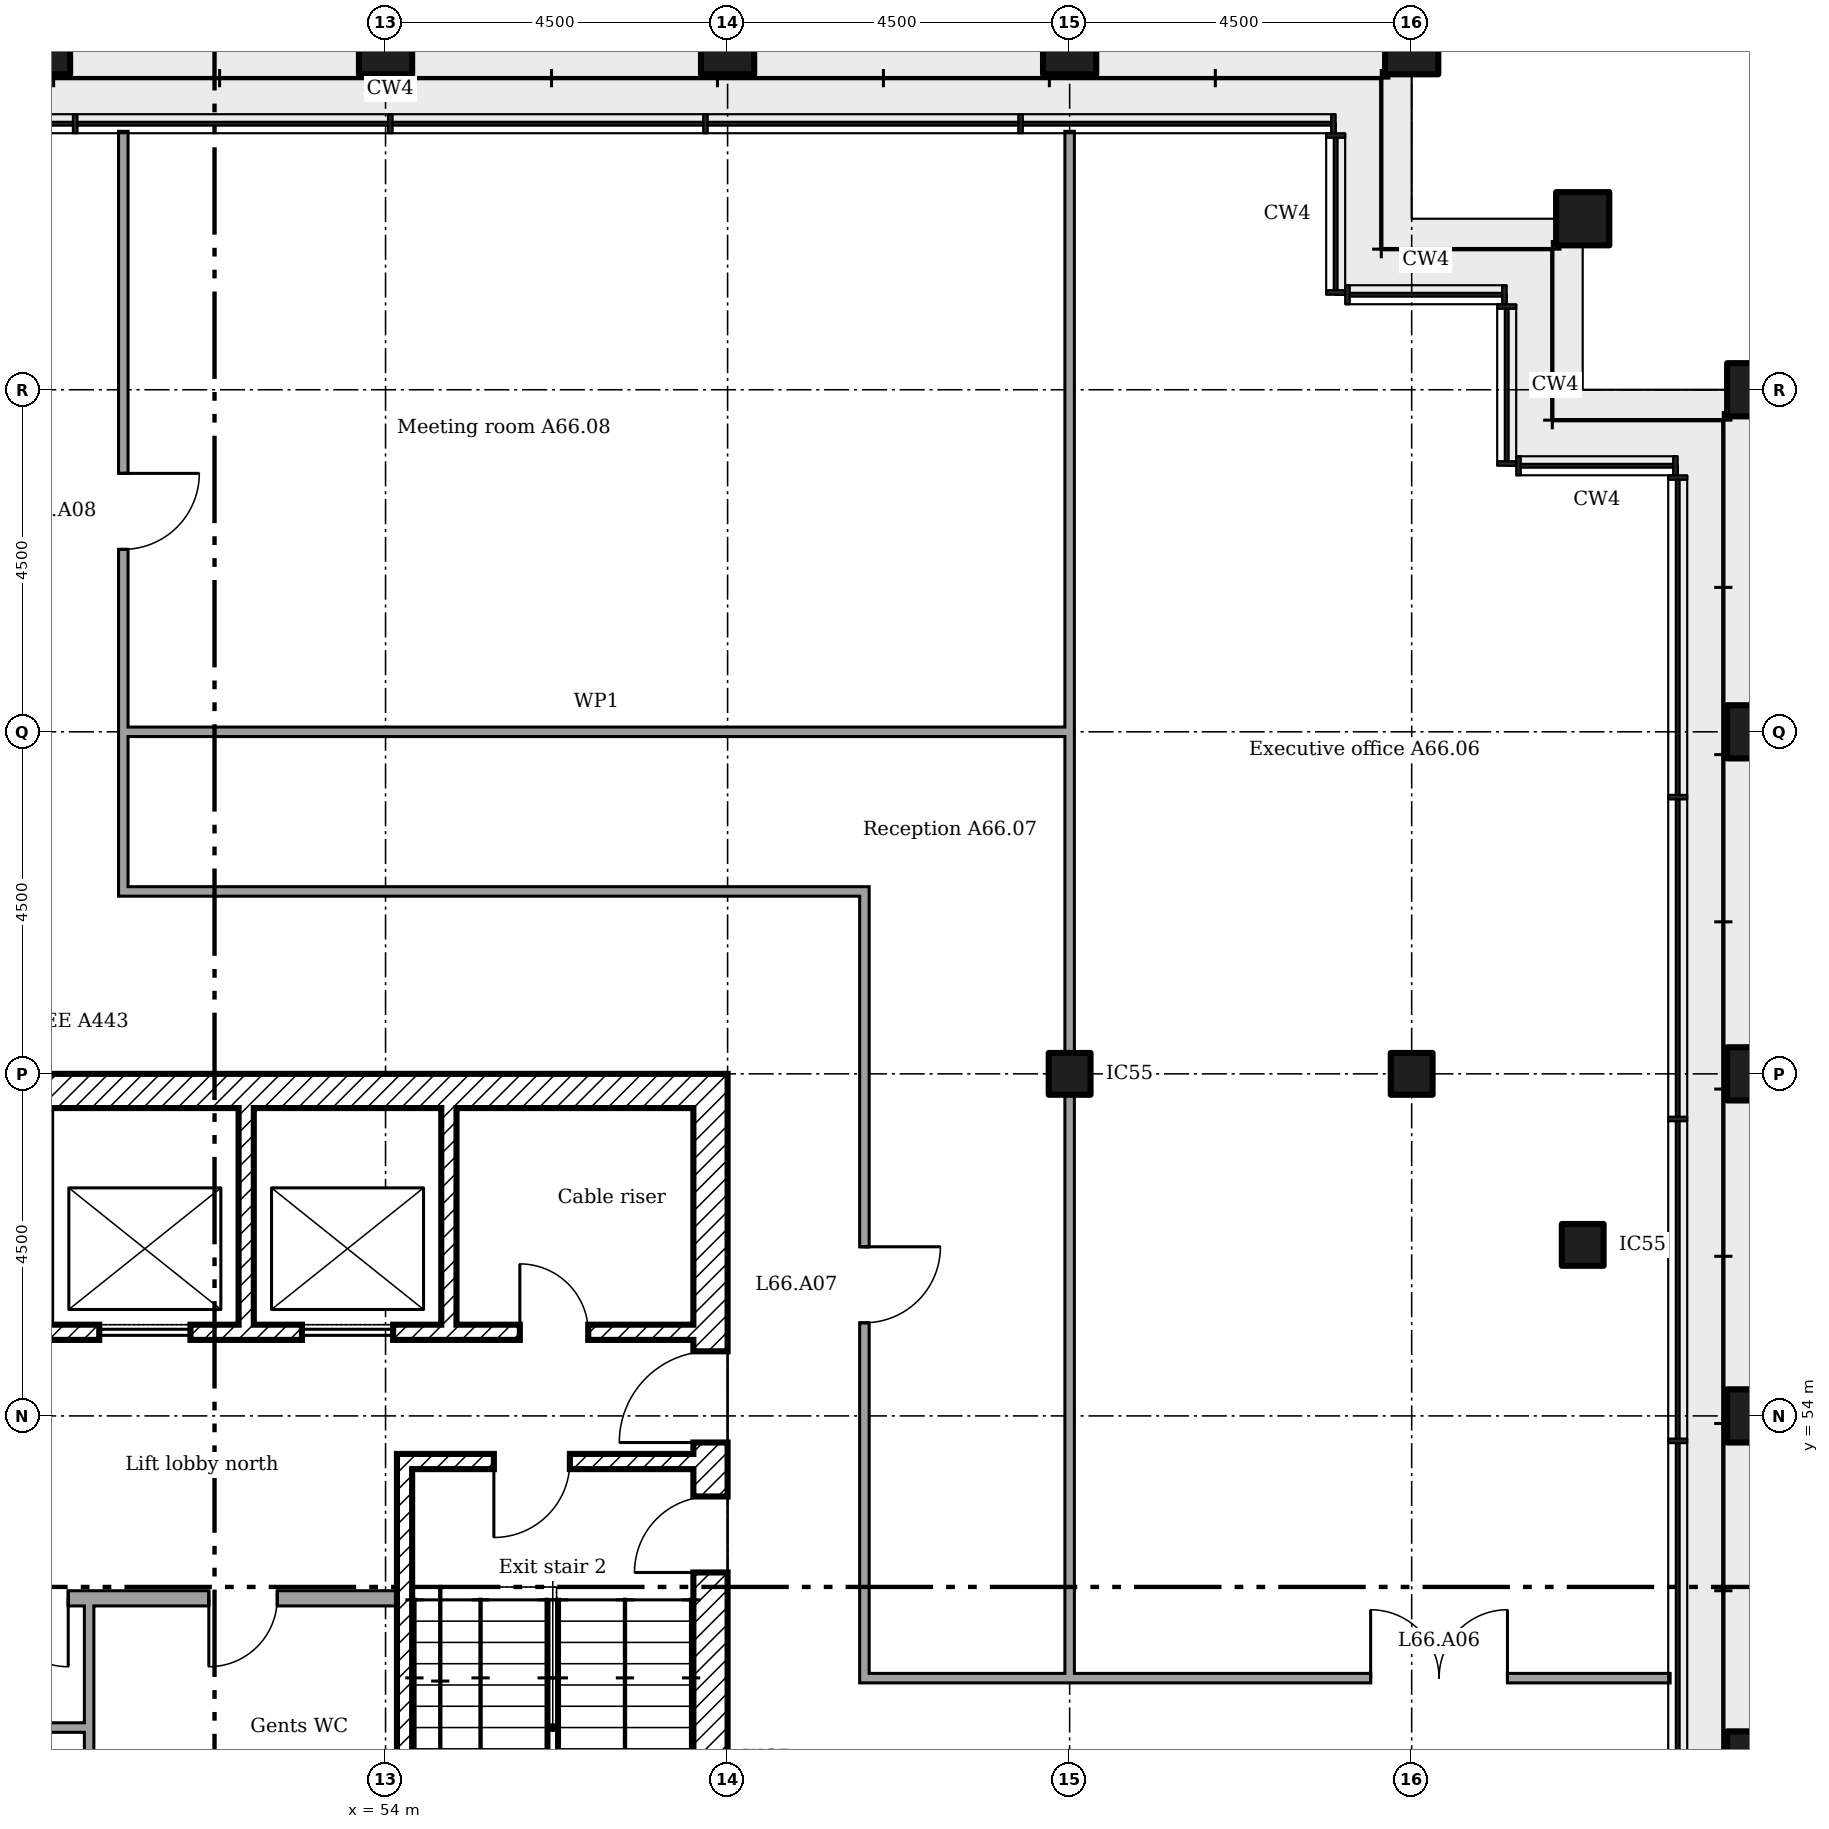
"""IFC4 building model, lengths in metres.
Left out: names, types, materials, properties, quantities, classifications, styles, units other than length and angle.
Written with IfcOpenShell. Run it as: python <this file> out.ifc"""

import sys

from ifc_helpers import new_model, si_unit, direction, frame, frame_2d, origin, origin_2d, place, context, subcontext, project, spatial, rectangle, extrude, element, fill, save


model = new_model("IFC4")
c1 = context("Model", 3, precision=1e-05, world=origin(), true_north=direction((0.0, 1.0)))
c2 = subcontext(c1, "Body", "Model", "MODEL_VIEW")
j1 = project(units=[si_unit("LENGTHUNIT", "METRE"), si_unit("PLANEANGLEUNIT", "RADIAN")], contexts=[c1])
p1 = place(None, origin())
s1 = spatial("IfcSite", under=j1, at=p1, CompositionType="ELEMENT")
p2 = place(p1, origin())
s2 = spatial("IfcBuilding", under=s1, at=p2, CompositionType="ELEMENT")
p3 = place(p2, frame((0.0, 0.0, 259.4)))
s3 = spatial("IfcBuildingStorey", under=s2, at=p3, CompositionType="ELEMENT", Elevation=259.4)
for number, where in (
    (1, (72.0, 49.5, 0.0)),
    (2, (72.0, 54.0, 0.0)),
    (3, (72.0, 58.5, 0.0)),
    (4, (72.0, 63.0, 0.0)),
    (5, (72.0, 67.5, 0.0)),
    (6, (69.75, 69.75, 0.0)),
    (7, (67.5, 72.0, 0.0)),
    (8, (63.0, 72.0, 0.0)),
    (9, (58.5, 72.0, 0.0)),
    (10, (54.0, 72.0, 0.0)),
    (11, (49.5, 72.0, 0.0)),
):
    element("IfcColumn", number, at=place(p3, frame(where)), inside=s3, PredefinedType="COLUMN", context=c2, shape_type="SweptSolid", body=[
        extrude(rectangle(XDim=0.7, YDim=0.7, at=origin_2d()), origin(), (0.0, 0.0, 1.0), 4.2),
    ])
for number, where in (
    (12, (63.0, 58.5, 0.0)),
    (13, (67.5, 58.5, 0.0)),
    (14, (69.75, 56.25, 0.0)),
):
    element("IfcColumn", number, at=place(p3, frame(where)), inside=s3, PredefinedType="COLUMN", context=c2, shape_type="SweptSolid", body=[
        extrude(rectangle(XDim=0.55, YDim=0.55, at=origin_2d()), origin(), (0.0, 0.0, 1.0), 4.2),
    ])
p4 = place(p3, frame((58.275, 40.5, 0.0), z_axis=(0.0, 0.0, 1.0), x_axis=(0.0, 1.0, 0.0)))
e15 = element("IfcWall", 15, at=p4, inside=s3, PredefinedType="SHEAR", context=c2, shape_type="SweptSolid", body=[
    extrude(rectangle(XDim=18.0, YDim=0.45, at=frame_2d((9.0, 0.0))), origin(), (0.0, 0.0, 1.0), 3.925),
])
p5 = place(p4, frame((13.15, 0.0, 0.0)))
e16 = element("IfcOpeningElement", 16, at=p5, cuts=e15, PredefinedType="OPENING", context=c2, shape_type="SweptSolid", body=[
    extrude(rectangle(XDim=1.2, YDim=2.1, at=frame_2d((0.6, 1.05))), frame((0.0, 0.235, 0.0), z_axis=(0.0, -1.0, 0.0), x_axis=(1.0, 0.0, 0.0)), (0.0, 0.0, 1.0), 0.47),
])
p6 = place(p4, frame((3.9, 0.0, 0.0)))
e17 = element("IfcOpeningElement", 17, at=p6, cuts=e15, PredefinedType="OPENING", context=c2, shape_type="SweptSolid", body=[
    extrude(rectangle(XDim=1.8, YDim=2.1, at=frame_2d((0.9, 1.05))), frame((0.0, 0.235, 0.0), z_axis=(0.0, -1.0, 0.0), x_axis=(1.0, 0.0, 0.0)), (0.0, 0.0, 1.0), 0.47),
])
p7 = place(p4, frame((11.44, 0.0, 0.0)))
e18 = element("IfcOpeningElement", 18, at=p7, cuts=e15, PredefinedType="OPENING", context=c2, shape_type="SweptSolid", body=[
    extrude(rectangle(XDim=1.0, YDim=2.1, at=frame_2d((0.5, 1.05))), frame((0.0, 0.235, 0.0), z_axis=(0.0, -1.0, 0.0), x_axis=(1.0, 0.0, 0.0)), (0.0, 0.0, 1.0), 0.47),
])
p8 = place(p3, frame((40.5, 58.275, 0.0)))
e19 = element("IfcWall", 19, at=p8, inside=s3, PredefinedType="SHEAR", context=c2, shape_type="SweptSolid", body=[
    extrude(rectangle(XDim=17.55, YDim=0.45, at=frame_2d((8.775, 0.0))), origin(), (0.0, 0.0, 1.0), 3.925),
])
for number, where, z_axis, x_axis in (
    (20, (52.167, 58.05, 0.0), (0.0, 0.0, 1.0), (0.0, -1.0, 0.0)),
    (21, (54.833, 58.05, 0.0), (0.0, 0.0, 1.0), (0.0, -1.0, 0.0)),
):
    element("IfcWall", number, at=place(p3, frame(where, z_axis=z_axis, x_axis=x_axis)), inside=s3, PredefinedType="SHEAR", context=c2, shape_type="SweptSolid", body=[
        extrude(rectangle(XDim=2.85, YDim=0.2, at=frame_2d((1.425, 0.0))), origin(), (0.0, 0.0, 1.0), 3.925),
    ])
p9 = place(p3, frame((46.933, 55.1, 0.0)))
e22 = element("IfcWall", 22, at=p9, inside=s3, PredefinedType="SHEAR", context=c2, shape_type="SweptSolid", body=[
    extrude(rectangle(XDim=11.117, YDim=0.2, at=frame_2d((5.558, 0.0))), origin(), (0.0, 0.0, 1.0), 3.925),
])
p10 = place(p9, frame((8.833, 0.0, 0.0)))
e23 = element("IfcOpeningElement", 23, at=p10, cuts=e22, PredefinedType="OPENING", context=c2, shape_type="SweptSolid", body=[
    extrude(rectangle(XDim=0.9, YDim=2.1, at=frame_2d((0.45, 1.05))), frame((0.0, 0.11, 0.0), z_axis=(0.0, -1.0, 0.0), x_axis=(1.0, 0.0, 0.0)), (0.0, 0.0, 1.0), 0.22),
])
p11 = place(p9, frame((0.633, 0.0, 0.0)))
e24 = element("IfcOpeningElement", 24, at=p11, cuts=e22, PredefinedType="OPENING", context=c2, shape_type="SweptSolid", body=[
    extrude(rectangle(XDim=1.2, YDim=2.1, at=frame_2d((0.6, 1.05))), frame((0.0, 0.11, 0.0), z_axis=(0.0, -1.0, 0.0), x_axis=(1.0, 0.0, 0.0)), (0.0, 0.0, 1.0), 0.22),
])
p12 = place(p9, frame((3.3, 0.0, 0.0)))
e25 = element("IfcOpeningElement", 25, at=p12, cuts=e22, PredefinedType="OPENING", context=c2, shape_type="SweptSolid", body=[
    extrude(rectangle(XDim=1.2, YDim=2.1, at=frame_2d((0.6, 1.05))), frame((0.0, 0.11, 0.0), z_axis=(0.0, -1.0, 0.0), x_axis=(1.0, 0.0, 0.0)), (0.0, 0.0, 1.0), 0.22),
])
p13 = place(p9, frame((5.967, 0.0, 0.0)))
e26 = element("IfcOpeningElement", 26, at=p13, cuts=e22, PredefinedType="OPENING", context=c2, shape_type="SweptSolid", body=[
    extrude(rectangle(XDim=1.2, YDim=2.1, at=frame_2d((0.6, 1.05))), frame((0.0, 0.11, 0.0), z_axis=(0.0, -1.0, 0.0), x_axis=(1.0, 0.0, 0.0)), (0.0, 0.0, 1.0), 0.22),
])
p14 = place(p3, frame((54.15, 53.4, 0.0)))
e27 = element("IfcWall", 27, at=p14, inside=s3, PredefinedType="SHEAR", context=c2, shape_type="SweptSolid", body=[
    extrude(rectangle(XDim=3.9, YDim=0.2, at=frame_2d((1.95, 0.0))), origin(), (0.0, 0.0, 1.0), 3.925),
])
p15 = place(p14, frame((1.275, 0.0, 0.0)))
e28 = element("IfcOpeningElement", 28, at=p15, cuts=e27, PredefinedType="OPENING", context=c2, shape_type="SweptSolid", body=[
    extrude(rectangle(XDim=1.0, YDim=2.1, at=frame_2d((0.5, 1.05))), frame((0.0, 0.11, 0.0), z_axis=(0.0, -1.0, 0.0), x_axis=(1.0, 0.0, 0.0)), (0.0, 0.0, 1.0), 0.22),
])
p16 = place(p3, frame((54.25, 46.5, 0.0), z_axis=(0.0, 0.0, 1.0), x_axis=(0.0, 1.0, 0.0)))
e29 = element("IfcWall", 29, at=p16, inside=s3, PredefinedType="SHEAR", context=c2, shape_type="SweptSolid", body=[
    extrude(rectangle(XDim=6.8, YDim=0.2, at=frame_2d((3.4, 0.0))), origin(), (0.0, 0.0, 1.0), 3.925),
])
p17 = place(p3, frame((44.85, 51.6, 0.0)))
e30 = element("IfcWall", 30, at=p17, inside=s3, PredefinedType="PARTITIONING", context=c2, shape_type="SweptSolid", body=[
    extrude(rectangle(XDim=9.3, YDim=0.2, at=frame_2d((4.65, 0.0))), origin(), (0.0, 0.0, 1.0), 3.925),
])
p18 = place(p17, frame((4.075, 0.0, 0.0)))
e31 = element("IfcOpeningElement", 31, at=p18, cuts=e30, PredefinedType="OPENING", context=c2, shape_type="SweptSolid", body=[
    extrude(rectangle(XDim=0.9, YDim=2.1, at=frame_2d((0.45, 1.05))), frame((0.0, 0.11, 0.0), z_axis=(0.0, -1.0, 0.0), x_axis=(1.0, 0.0, 0.0)), (0.0, 0.0, 1.0), 0.22),
])
p19 = place(p17, frame((6.825, 0.0, 0.0)))
e32 = element("IfcOpeningElement", 32, at=p19, cuts=e30, PredefinedType="OPENING", context=c2, shape_type="SweptSolid", body=[
    extrude(rectangle(XDim=0.9, YDim=2.1, at=frame_2d((0.45, 1.05))), frame((0.0, 0.11, 0.0), z_axis=(0.0, -1.0, 0.0), x_axis=(1.0, 0.0, 0.0)), (0.0, 0.0, 1.0), 0.22),
])
p20 = place(p3, frame((50.1, 48.7, 0.0), z_axis=(0.0, 0.0, 1.0), x_axis=(0.0, 1.0, 0.0)))
e33 = element("IfcWall", 33, at=p20, inside=s3, PredefinedType="PARTITIONING", context=c2, shape_type="SweptSolid", body=[
    extrude(rectangle(XDim=1.262, YDim=0.125, at=frame_2d((0.631, 0.0))), origin(), (0.0, 0.0, 1.0), 3.925),
])
p21 = place(p3, frame((50.038, 49.9, 0.0), z_axis=(0.0, 0.0, 1.0), x_axis=(-1.0, 0.0, 0.0)))
e34 = element("IfcWall", 34, at=p21, inside=s3, PredefinedType="PARTITIONING", context=c2, shape_type="SweptSolid", body=[
    extrude(rectangle(XDim=5.188, YDim=0.125, at=frame_2d((2.594, 0.0))), origin(), (0.0, 0.0, 1.0), 3.925),
])
p22 = place(p3, frame((50.1, 49.9, 0.0), z_axis=(0.0, 0.0, 1.0), x_axis=(0.0, 1.0, 0.0)))
e35 = element("IfcWall", 35, at=p22, inside=s3, PredefinedType="PARTITIONING", context=c2, shape_type="SweptSolid", body=[
    extrude(rectangle(XDim=1.6, YDim=0.125, at=frame_2d((0.8, 0.0))), origin(), (0.0, 0.0, 1.0), 3.925),
])
p23 = place(p3, frame((60.238, 50.55, 0.0)))
e36 = element("IfcWall", 36, at=p23, inside=s3, PredefinedType="PARTITIONING", context=c2, shape_type="SweptSolid", body=[
    extrude(rectangle(XDim=10.662, YDim=0.125, at=frame_2d((5.331, 0.0))), origin(), (0.0, 0.0, 1.0), 4.025),
])
p24 = place(p23, frame((6.722, 0.0, 0.0)))
e37 = element("IfcOpeningElement", 37, at=p24, cuts=e36, PredefinedType="OPENING", context=c2, shape_type="SweptSolid", body=[
    extrude(rectangle(XDim=1.8, YDim=2.1, at=frame_2d((0.9, 1.05))), frame((0.0, 0.073, 0.0), z_axis=(0.0, -1.0, 0.0), x_axis=(1.0, 0.0, 0.0)), (0.0, 0.0, 1.0), 0.145),
])
p25 = place(p3, frame((50.488, 60.9, 0.0)))
e38 = element("IfcWall", 38, at=p25, inside=s3, PredefinedType="PARTITIONING", context=c2, shape_type="SweptSolid", body=[
    extrude(rectangle(XDim=9.875, YDim=0.125, at=frame_2d((4.938, 0.0))), origin(), (0.0, 0.0, 1.0), 4.025),
])
p26 = place(p3, frame((50.55, 63.0, 0.0)))
e39 = element("IfcWall", 39, at=p26, inside=s3, PredefinedType="PARTITIONING", context=c2, shape_type="SweptSolid", body=[
    extrude(rectangle(XDim=12.45, YDim=0.125, at=frame_2d((6.225, 0.0))), origin(), (0.0, 0.0, 1.0), 4.025),
])
p27 = place(p3, frame((50.55, 60.962, 0.0), z_axis=(0.0, 0.0, 1.0), x_axis=(0.0, 1.0, 0.0)))
e40 = element("IfcWall", 40, at=p27, inside=s3, PredefinedType="PARTITIONING", context=c2, shape_type="SweptSolid", body=[
    extrude(rectangle(XDim=9.938, YDim=0.125, at=frame_2d((4.969, 0.0))), origin(), (0.0, 0.0, 1.0), 4.025),
])
p28 = place(p27, frame((4.438, 0.0, 0.0)))
e41 = element("IfcOpeningElement", 41, at=p28, cuts=e40, PredefinedType="OPENING", context=c2, shape_type="SweptSolid", body=[
    extrude(rectangle(XDim=1.0, YDim=2.1, at=frame_2d((0.5, 1.05))), frame((0.0, 0.073, 0.0), z_axis=(0.0, -1.0, 0.0), x_axis=(1.0, 0.0, 0.0)), (0.0, 0.0, 1.0), 0.145),
])
p29 = place(p3, frame((60.3, 50.613, 0.0), z_axis=(0.0, 0.0, 1.0), x_axis=(0.0, 1.0, 0.0)))
e42 = element("IfcWall", 42, at=p29, inside=s3, PredefinedType="PARTITIONING", context=c2, shape_type="SweptSolid", body=[
    extrude(rectangle(XDim=10.225, YDim=0.125, at=frame_2d((5.112, 0.0))), origin(), (0.0, 0.0, 1.0), 4.025),
])
p30 = place(p29, frame((4.613, 0.0, 0.0)))
e43 = element("IfcOpeningElement", 43, at=p30, cuts=e42, PredefinedType="OPENING", context=c2, shape_type="SweptSolid", body=[
    extrude(rectangle(XDim=1.0, YDim=2.1, at=frame_2d((0.5, 1.05))), frame((0.0, 0.073, 0.0), z_axis=(0.0, -1.0, 0.0), x_axis=(1.0, 0.0, 0.0)), (0.0, 0.0, 1.0), 0.145),
])
p31 = place(p3, frame((63.0, 50.55, 0.0), z_axis=(0.0, 0.0, 1.0), x_axis=(0.0, 1.0, 0.0)))
e44 = element("IfcWall", 44, at=p31, inside=s3, PredefinedType="PARTITIONING", context=c2, shape_type="SweptSolid", body=[
    extrude(rectangle(XDim=7.675, YDim=0.125, at=frame_2d((3.837, 0.0))), origin(), (0.0, 0.0, 1.0), 4.025),
])
p32 = place(p3, frame((63.0, 58.775, 0.0), z_axis=(0.0, 0.0, 1.0), x_axis=(0.0, 1.0, 0.0)))
e45 = element("IfcWall", 45, at=p32, inside=s3, PredefinedType="PARTITIONING", context=c2, shape_type="SweptSolid", body=[
    extrude(rectangle(XDim=12.125, YDim=0.125, at=frame_2d((6.062, 0.0))), origin(), (0.0, 0.0, 1.0), 3.341),
])
p33 = place(p5, origin())
e46 = element("IfcDoor", 46, at=p33, inside=s3, OperationType="SINGLE_SWING_RIGHT", PredefinedType="DOOR", context=c2, shape_type="SweptSolid", body=[
    extrude(rectangle(XDim=1.2, YDim=2.1, at=frame_2d((0.6, 1.05))), frame((0.0, 0.025, 0.0), z_axis=(0.0, -1.0, 0.0), x_axis=(1.0, 0.0, 0.0)), (0.0, 0.0, 1.0), 0.05),
])
fill(e16, e46)
p34 = place(p15, frame((1.0, 0.0, 0.0), x_axis=(-1.0, 0.0, 0.0)))
e47 = element("IfcDoor", 47, at=p34, inside=s3, OperationType="SINGLE_SWING_LEFT", PredefinedType="DOOR", context=c2, shape_type="SweptSolid", body=[
    extrude(rectangle(XDim=1.0, YDim=2.1, at=frame_2d((0.5, 1.05))), frame((0.0, 0.025, 0.0), z_axis=(0.0, -1.0, 0.0), x_axis=(1.0, 0.0, 0.0)), (0.0, 0.0, 1.0), 0.05),
])
fill(e28, e47)
p35 = place(p7, origin())
e48 = element("IfcDoor", 48, at=p35, inside=s3, OperationType="SINGLE_SWING_RIGHT", PredefinedType="DOOR", context=c2, shape_type="SweptSolid", body=[
    extrude(rectangle(XDim=1.0, YDim=2.1, at=frame_2d((0.5, 1.05))), frame((0.0, 0.025, 0.0), z_axis=(0.0, -1.0, 0.0), x_axis=(1.0, 0.0, 0.0)), (0.0, 0.0, 1.0), 0.05),
])
fill(e18, e48)
p36 = place(p10, origin())
e49 = element("IfcDoor", 49, at=p36, inside=s3, OperationType="SINGLE_SWING_RIGHT", PredefinedType="DOOR", context=c2, shape_type="SweptSolid", body=[
    extrude(rectangle(XDim=0.9, YDim=2.1, at=frame_2d((0.45, 1.05))), frame((0.0, 0.025, 0.0), z_axis=(0.0, -1.0, 0.0), x_axis=(1.0, 0.0, 0.0)), (0.0, 0.0, 1.0), 0.05),
])
fill(e23, e49)
p37 = place(p18, frame((0.9, 0.0, 0.0), x_axis=(-1.0, 0.0, 0.0)))
e50 = element("IfcDoor", 50, at=p37, inside=s3, OperationType="SINGLE_SWING_RIGHT", PredefinedType="DOOR", context=c2, shape_type="SweptSolid", body=[
    extrude(rectangle(XDim=0.9, YDim=2.1, at=frame_2d((0.45, 1.05))), frame((0.0, 0.025, 0.0), z_axis=(0.0, -1.0, 0.0), x_axis=(1.0, 0.0, 0.0)), (0.0, 0.0, 1.0), 0.05),
])
fill(e31, e50)
p38 = place(p19, frame((0.9, 0.0, 0.0), x_axis=(-1.0, 0.0, 0.0)))
e51 = element("IfcDoor", 51, at=p38, inside=s3, OperationType="SINGLE_SWING_LEFT", PredefinedType="DOOR", context=c2, shape_type="SweptSolid", body=[
    extrude(rectangle(XDim=0.9, YDim=2.1, at=frame_2d((0.45, 1.05))), frame((0.0, 0.025, 0.0), z_axis=(0.0, -1.0, 0.0), x_axis=(1.0, 0.0, 0.0)), (0.0, 0.0, 1.0), 0.05),
])
fill(e32, e51)
p39 = place(p12, origin())
e52 = element("IfcDoor", 52, at=p39, inside=s3, OperationType="SLIDING_TO_LEFT", PredefinedType="DOOR", context=c2, shape_type="SweptSolid", body=[
    extrude(rectangle(XDim=1.2, YDim=2.1, at=frame_2d((0.6, 1.05))), frame((0.0, 0.025, 0.0), z_axis=(0.0, -1.0, 0.0), x_axis=(1.0, 0.0, 0.0)), (0.0, 0.0, 1.0), 0.05),
])
fill(e25, e52)
p40 = place(p13, origin())
e53 = element("IfcDoor", 53, at=p40, inside=s3, OperationType="SLIDING_TO_LEFT", PredefinedType="DOOR", context=c2, shape_type="SweptSolid", body=[
    extrude(rectangle(XDim=1.2, YDim=2.1, at=frame_2d((0.6, 1.05))), frame((0.0, 0.025, 0.0), z_axis=(0.0, -1.0, 0.0), x_axis=(1.0, 0.0, 0.0)), (0.0, 0.0, 1.0), 0.05),
])
fill(e26, e53)
p41 = place(p24, origin())
e54 = element("IfcDoor", 54, at=p41, inside=s3, OperationType="DOUBLE_DOOR_SINGLE_SWING", PredefinedType="DOOR", context=c2, shape_type="SweptSolid", body=[
    extrude(rectangle(XDim=1.8, YDim=2.1, at=frame_2d((0.9, 1.05))), frame((0.0, 0.025, 0.0), z_axis=(0.0, -1.0, 0.0), x_axis=(1.0, 0.0, 0.0)), (0.0, 0.0, 1.0), 0.05),
])
fill(e37, e54)
p42 = place(p30, frame((1.0, 0.0, 0.0), x_axis=(-1.0, 0.0, 0.0)))
e55 = element("IfcDoor", 55, at=p42, inside=s3, OperationType="SINGLE_SWING_RIGHT", PredefinedType="DOOR", context=c2, shape_type="SweptSolid", body=[
    extrude(rectangle(XDim=1.0, YDim=2.1, at=frame_2d((0.5, 1.05))), frame((0.0, 0.025, 0.0), z_axis=(0.0, -1.0, 0.0), x_axis=(1.0, 0.0, 0.0)), (0.0, 0.0, 1.0), 0.05),
])
fill(e43, e55)
p43 = place(p28, frame((1.0, 0.0, 0.0), x_axis=(-1.0, 0.0, 0.0)))
e56 = element("IfcDoor", 56, at=p43, inside=s3, OperationType="SINGLE_SWING_RIGHT", PredefinedType="DOOR", context=c2, shape_type="SweptSolid", body=[
    extrude(rectangle(XDim=1.0, YDim=2.1, at=frame_2d((0.5, 1.05))), frame((0.0, 0.025, 0.0), z_axis=(0.0, -1.0, 0.0), x_axis=(1.0, 0.0, 0.0)), (0.0, 0.0, 1.0), 0.05),
])
fill(e41, e56)
save(model, sys.argv[1])
